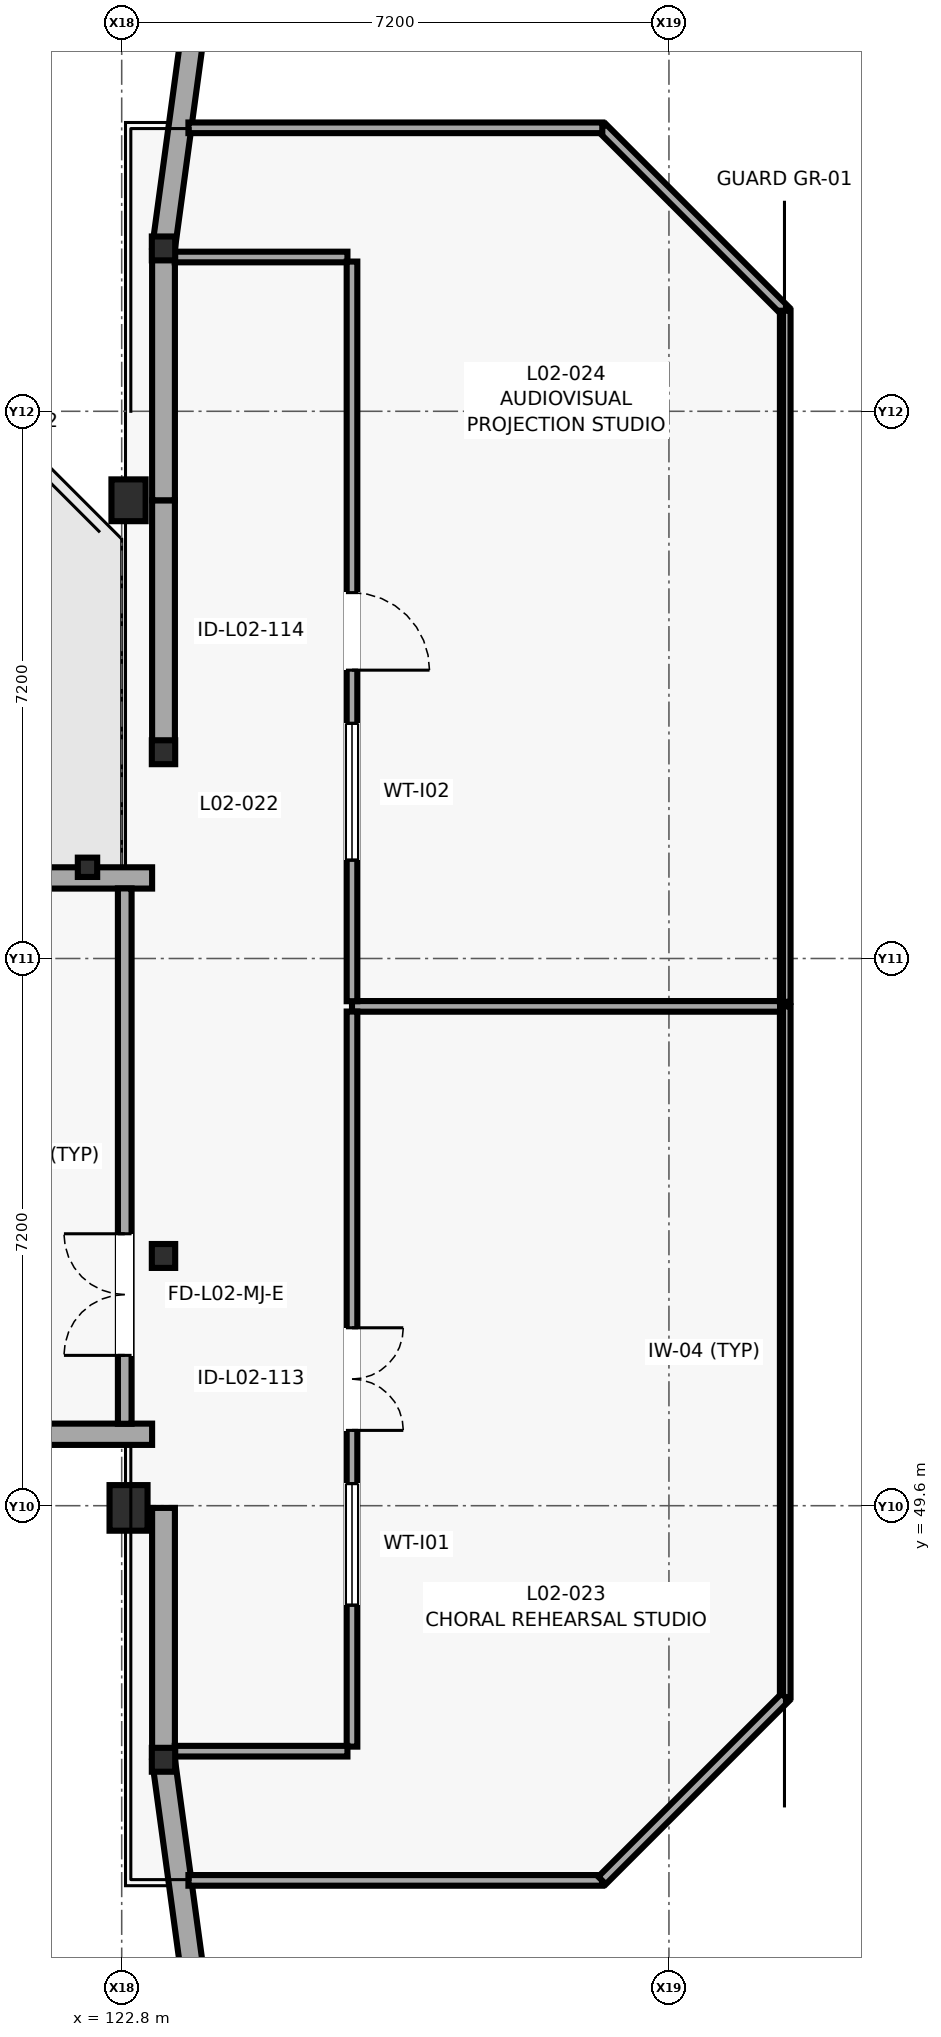
"""IFC4 building model, lengths in metres.
Left out: names, types, materials, properties, quantities, classifications, styles, units other than length and angle.
Written with IfcOpenShell. Run it as: python <this file> out.ifc"""

import sys

from ifc_helpers import new_model, si_unit, direction, frame, frame_2d, origin, origin_2d, place, context, subcontext, project, spatial, rectangle, i_section, extrude, element, fill, save


model = new_model("IFC4")
c1 = context("Model", 3, precision=1e-05, world=origin(), true_north=direction((0.0, 1.0)))
c2 = subcontext(c1, "Body", "Model", "MODEL_VIEW")
j1 = project(units=[si_unit("LENGTHUNIT", "METRE"), si_unit("PLANEANGLEUNIT", "RADIAN")], contexts=[c1])
p1 = place(None, origin())
s1 = spatial("IfcSite", under=j1, at=p1, CompositionType="ELEMENT")
p2 = place(p1, origin())
s2 = spatial("IfcBuilding", under=s1, at=p2, CompositionType="ELEMENT")
p3 = place(p2, frame((0.0, 0.0, 8.2)))
s3 = spatial("IfcBuildingStorey", under=s2, at=p3, CompositionType="ELEMENT", Elevation=8.2)
p4 = place(p3, frame((122.35, 58.0, 0.0), z_axis=(0.0, 0.0, 1.0), x_axis=(1.0, 0.0, 0.0)))
e1 = element("IfcColumn", 1, at=p4, inside=s3, PredefinedType="COLUMN", context=c2, shape_type="SweptSolid", body=[
    extrude(i_section(OverallWidth=0.255, OverallDepth=0.254, WebThickness=0.009, FlangeThickness=0.014, FilletRadius=0.013, at=origin_2d()), origin(), (0.0, 0.0, 1.0), 4.0),
])
p5 = place(p3, frame((122.89, 49.571, 0.0), z_axis=(0.0, 0.0, 1.0), x_axis=(1.0, 0.0, 0.0)))
e2 = element("IfcColumn", 2, at=p5, inside=s3, PredefinedType="PILASTER", context=c2, shape_type="SweptSolid", body=[
    extrude(rectangle(XDim=0.5, YDim=0.6, at=origin_2d()), origin(), (0.0, 0.0, 1.0), 4.0),
])
p6 = place(p3, frame((122.89, 62.829, 0.0), z_axis=(0.0, 0.0, 1.0), x_axis=(1.0, 0.0, 0.0)))
e3 = element("IfcColumn", 3, at=p6, inside=s3, PredefinedType="PILASTER", context=c2, shape_type="SweptSolid", body=[
    extrude(rectangle(XDim=0.45, YDim=0.55, at=origin_2d()), origin(), (0.0, 0.0, 1.0), 4.0),
])
for number, where, z_axis, x_axis in (
    (4, (123.35, 46.257, 0.0), (0.0, 0.0, 1.0), (1.0, 0.0, 0.0)),
    (5, (123.35, 52.886, 0.0), (0.0, 0.0, 1.0), (1.0, 0.0, 0.0)),
    (6, (123.35, 59.514, 0.0), (0.0, 0.0, 1.0), (1.0, 0.0, 0.0)),
    (7, (123.35, 66.143, 0.0), (0.0, 0.0, 1.0), (1.0, 0.0, 0.0)),
):
    element("IfcColumn", number, at=place(p3, frame(where, z_axis=z_axis, x_axis=x_axis)), inside=s3, PredefinedType="COLUMN", context=c2, shape_type="SweptSolid", body=[
        extrude(i_section(OverallWidth=0.307, OverallDepth=0.314, WebThickness=0.012, FlangeThickness=0.019, FilletRadius=0.015, at=origin_2d()), origin(), (0.0, 0.0, 1.0), 4.0),
    ])
p7 = place(p3, frame((123.35, 46.257, 0.0), z_axis=(0.0, 0.0, 1.0), x_axis=(0.134539839792, -0.990908185206, 0.0)))
e8 = element("IfcWall", 8, at=p7, inside=s3, PredefinedType="SOLIDWALL", context=c2, shape_type="SweptSolid", body=[
    extrude(rectangle(XDim=3.344, YDim=0.3, at=frame_2d((1.672, 0.0))), origin(), (0.0, 0.0, 1.0), 3.745),
])
p8 = place(p3, frame((123.35, 49.571, 0.0), z_axis=(0.0, 0.0, 1.0), x_axis=(0.0, -1.0, 0.0)))
e9 = element("IfcWall", 9, at=p8, inside=s3, PredefinedType="SOLIDWALL", context=c2, shape_type="SweptSolid", body=[
    extrude(rectangle(XDim=3.314, YDim=0.3, at=frame_2d((1.657, 0.0))), origin(), (0.0, 0.0, 1.0), 3.505),
])
p9 = place(p3, frame((123.35, 62.829, 0.0), z_axis=(0.0, 0.0, 1.0), x_axis=(0.0, -1.0, 0.0)))
e10 = element("IfcWall", 10, at=p9, inside=s3, PredefinedType="SOLIDWALL", context=c2, shape_type="SweptSolid", body=[
    extrude(rectangle(XDim=3.315, YDim=0.3, at=frame_2d((1.658, 0.0))), origin(), (0.0, 0.0, 1.0), 3.505),
])
p10 = place(p3, frame((123.35, 66.143, 0.0), z_axis=(0.0, 0.0, 1.0), x_axis=(0.0, -1.0, 0.0)))
e11 = element("IfcWall", 11, at=p10, inside=s3, PredefinedType="SOLIDWALL", context=c2, shape_type="SweptSolid", body=[
    extrude(rectangle(XDim=3.314, YDim=0.3, at=frame_2d((1.657, 0.0))), origin(), (0.0, 0.0, 1.0), 3.505),
])
p11 = place(p3, frame((123.8, 69.457, 0.0), z_axis=(0.0, 0.0, 1.0), x_axis=(-0.134539839792, -0.990908185206, 0.0)))
e12 = element("IfcWall", 12, at=p11, inside=s3, PredefinedType="SOLIDWALL", context=c2, shape_type="SweptSolid", body=[
    extrude(rectangle(XDim=3.344, YDim=0.3, at=frame_2d((1.672, 0.0))), origin(), (0.0, 0.0, 1.0), 3.745),
])
p12 = place(p3, frame((115.32, 50.54, 0.0), z_axis=(0.0, 0.0, 1.0), x_axis=(1.0, 0.0, 0.0)))
e13 = element("IfcWall", 13, at=p12, inside=s3, PredefinedType="SOLIDWALL", context=c2, shape_type="SweptSolid", body=[
    extrude(rectangle(XDim=7.88, YDim=0.28, at=frame_2d((3.94, 0.0))), origin(), (0.0, 0.0, 1.0), 3.78),
])
p13 = place(p12, frame((0.82, 0.0, 1.05)))
e14 = element("IfcOpeningElement", 14, at=p13, cuts=e13, PredefinedType="OPENING", context=c2, shape_type="SweptSolid", body=[
    extrude(rectangle(XDim=2.3, YDim=1.45, at=frame_2d((1.15, 0.725))), frame((0.0, 0.15, 0.0), z_axis=(0.0, -1.0, 0.0), x_axis=(1.0, 0.0, 0.0)), (0.0, 0.0, 1.0), 0.3),
])
p14 = place(p12, frame((5.335, 0.0, 1.05)))
e15 = element("IfcOpeningElement", 15, at=p14, cuts=e13, PredefinedType="OPENING", context=c2, shape_type="SweptSolid", body=[
    extrude(rectangle(XDim=1.15, YDim=1.4, at=frame_2d((0.575, 0.7))), frame((0.0, 0.15, 0.0), z_axis=(0.0, -1.0, 0.0), x_axis=(1.0, 0.0, 0.0)), (0.0, 0.0, 1.0), 0.3),
])
p15 = place(p3, frame((123.2, 57.86, 0.0), z_axis=(0.0, 0.0, 1.0), x_axis=(-1.0, 0.0, 0.0)))
e16 = element("IfcWall", 16, at=p15, inside=s3, PredefinedType="SOLIDWALL", context=c2, shape_type="SweptSolid", body=[
    extrude(rectangle(XDim=7.88, YDim=0.28, at=frame_2d((3.94, 0.0))), origin(), (0.0, 0.0, 1.0), 3.11),
])
p16 = place(p15, frame((1.445, 0.0, 1.05)))
e17 = element("IfcOpeningElement", 17, at=p16, cuts=e16, PredefinedType="OPENING", context=c2, shape_type="SweptSolid", body=[
    extrude(rectangle(XDim=1.05, YDim=1.3, at=frame_2d((0.525, 0.65))), frame((0.0, 0.15, 0.0), z_axis=(0.0, -1.0, 0.0), x_axis=(1.0, 0.0, 0.0)), (0.0, 0.0, 1.0), 0.3),
])
p17 = place(p15, frame((5.11, 0.0, 1.05)))
e18 = element("IfcOpeningElement", 18, at=p17, cuts=e16, PredefinedType="OPENING", context=c2, shape_type="SweptSolid", body=[
    extrude(rectangle(XDim=1.6, YDim=1.35, at=frame_2d((0.8, 0.675))), frame((0.0, 0.15, 0.0), z_axis=(0.0, -1.0, 0.0), x_axis=(1.0, 0.0, 0.0)), (0.0, 0.0, 1.0), 0.3),
])
p18 = place(p3, frame((122.84, 50.678, 0.0), z_axis=(0.0, 0.0, 1.0), x_axis=(0.0, 1.0, 0.0)))
e19 = element("IfcWall", 19, at=p18, inside=s3, PredefinedType="PARTITIONING", context=c2, shape_type="SweptSolid", body=[
    extrude(rectangle(XDim=7.044, YDim=0.18, at=frame_2d((3.522, 0.0))), origin(), (0.0, 0.0, 1.0), 3.78),
])
p19 = place(p18, frame((0.9, 0.0, 0.0)))
e20 = element("IfcOpeningElement", 20, at=p19, cuts=e19, PredefinedType="OPENING", context=c2, shape_type="SweptSolid", body=[
    extrude(rectangle(XDim=1.6, YDim=2.25, at=frame_2d((0.8, 1.125))), frame((0.0, 0.1, 0.0), z_axis=(0.0, -1.0, 0.0), x_axis=(1.0, 0.0, 0.0)), (0.0, 0.0, 1.0), 0.2),
])
p20 = place(p3, frame((131.53, 47.079, 0.0), z_axis=(0.0, 0.0, 1.0), x_axis=(0.0, 1.0, 0.0)))
e21 = element("IfcWall", 21, at=p20, inside=s3, PredefinedType="PARTITIONING", context=c2, shape_type="SweptSolid", body=[
    extrude(rectangle(XDim=9.091, YDim=0.14, at=frame_2d((4.545, 0.0))), origin(), (0.0, 0.0, 1.0), 3.755),
])
p21 = place(p3, frame((131.462, 56.17, 0.0), z_axis=(0.0, 0.0, 1.0), x_axis=(-1.0, 0.0, 0.0)))
e22 = element("IfcWall", 22, at=p21, inside=s3, PredefinedType="PARTITIONING", context=c2, shape_type="SweptSolid", body=[
    extrude(rectangle(XDim=5.632, YDim=0.14, at=frame_2d((2.816, 0.0))), origin(), (0.0, 0.0, 1.0), 3.755),
])
p22 = place(p3, frame((125.83, 56.102, 0.0), z_axis=(0.0, 0.0, 1.0), x_axis=(0.0, -1.0, 0.0)))
e23 = element("IfcWall", 23, at=p22, inside=s3, PredefinedType="PARTITIONING", context=c2, shape_type="SweptSolid", body=[
    extrude(rectangle(XDim=9.672, YDim=0.14, at=frame_2d((4.836, 0.0))), origin(), (0.0, 0.0, 1.0), 3.755),
])
p23 = place(p22, frame((4.161, 0.0, 0.0)))
e24 = element("IfcOpeningElement", 24, at=p23, cuts=e23, PredefinedType="OPENING", context=c2, shape_type="SweptSolid", body=[
    extrude(rectangle(XDim=1.35, YDim=2.25, at=frame_2d((0.675, 1.125))), frame((0.0, 0.08, 0.0), z_axis=(0.0, -1.0, 0.0), x_axis=(1.0, 0.0, 0.0)), (0.0, 0.0, 1.0), 0.16),
])
p24 = place(p22, frame((6.211, 0.0, 1.05)))
e25 = element("IfcOpeningElement", 25, at=p24, cuts=e23, PredefinedType="OPENING", context=c2, shape_type="SweptSolid", body=[
    extrude(rectangle(XDim=1.6, YDim=1.1, at=frame_2d((0.8, 0.55))), frame((0.0, 0.08, 0.0), z_axis=(0.0, -1.0, 0.0), x_axis=(1.0, 0.0, 0.0)), (0.0, 0.0, 1.0), 0.16),
])
p25 = place(p3, frame((125.77, 46.37, 0.0), z_axis=(0.0, 0.0, 1.0), x_axis=(-1.0, 0.0, 0.0)))
e26 = element("IfcWall", 26, at=p25, inside=s3, PredefinedType="PARTITIONING", context=c2, shape_type="SweptSolid", body=[
    extrude(rectangle(XDim=2.272, YDim=0.14, at=frame_2d((1.136, 0.0))), origin(), (0.0, 0.0, 1.0), 3.755),
])
p26 = place(p3, frame((123.678, 44.67, 0.0), z_axis=(0.0, 0.0, 1.0), x_axis=(1.0, 0.0, 0.0)))
e27 = element("IfcWall", 27, at=p26, inside=s3, PredefinedType="PARTITIONING", context=c2, shape_type="SweptSolid", body=[
    extrude(rectangle(XDim=5.443, YDim=0.14, at=frame_2d((2.722, 0.0))), origin(), (0.0, 0.0, 1.0), 3.755),
])
p27 = place(p3, frame((129.12, 44.669, 0.0), z_axis=(0.0, 0.0, 1.0), x_axis=(0.707070979218, 0.707142581342, 0.0)))
e28 = element("IfcWall", 28, at=p27, inside=s3, PredefinedType="PARTITIONING", context=c2, shape_type="SweptSolid", body=[
    extrude(rectangle(XDim=3.41, YDim=0.14, at=frame_2d((1.705, 0.0))), origin(), (0.0, 0.0, 1.0), 3.755),
])
p28 = place(p3, frame((131.53, 65.321, 0.0), z_axis=(0.0, 0.0, 1.0), x_axis=(-0.707106781187, 0.707106781187, 0.0)))
e29 = element("IfcWall", 29, at=p28, inside=s3, PredefinedType="PARTITIONING", context=c2, shape_type="SweptSolid", body=[
    extrude(rectangle(XDim=3.407, YDim=0.14, at=frame_2d((1.703, 0.0))), origin(), (0.0, 0.0, 1.0), 3.755),
])
p29 = place(p3, frame((129.123, 67.73, 0.0), z_axis=(0.0, 0.0, 1.0), x_axis=(-1.0, 0.0, 0.0)))
e30 = element("IfcWall", 30, at=p29, inside=s3, PredefinedType="PARTITIONING", context=c2, shape_type="SweptSolid", body=[
    extrude(rectangle(XDim=5.445, YDim=0.14, at=frame_2d((2.723, 0.0))), origin(), (0.0, 0.0, 1.0), 3.755),
])
p30 = place(p3, frame((123.498, 66.03, 0.0), z_axis=(0.0, 0.0, 1.0), x_axis=(1.0, 0.0, 0.0)))
e31 = element("IfcWall", 31, at=p30, inside=s3, PredefinedType="PARTITIONING", context=c2, shape_type="SweptSolid", body=[
    extrude(rectangle(XDim=2.272, YDim=0.14, at=frame_2d((1.136, 0.0))), origin(), (0.0, 0.0, 1.0), 3.755),
])
p31 = place(p3, frame((125.83, 65.97, 0.0), z_axis=(0.0, 0.0, 1.0), x_axis=(0.0, -1.0, 0.0)))
e32 = element("IfcWall", 32, at=p31, inside=s3, PredefinedType="PARTITIONING", context=c2, shape_type="SweptSolid", body=[
    extrude(rectangle(XDim=9.732, YDim=0.14, at=frame_2d((4.866, 0.0))), origin(), (0.0, 0.0, 1.0), 3.755),
])
p32 = place(p31, frame((4.356, 0.0, 0.0)))
e33 = element("IfcOpeningElement", 33, at=p32, cuts=e32, PredefinedType="OPENING", context=c2, shape_type="SweptSolid", body=[
    extrude(rectangle(XDim=1.02, YDim=2.14, at=frame_2d((0.51, 1.07))), frame((0.0, 0.08, 0.0), z_axis=(0.0, -1.0, 0.0), x_axis=(1.0, 0.0, 0.0)), (0.0, 0.0, 1.0), 0.16),
])
p33 = place(p31, frame((6.076, 0.0, 1.05)))
e34 = element("IfcOpeningElement", 34, at=p33, cuts=e32, PredefinedType="OPENING", context=c2, shape_type="SweptSolid", body=[
    extrude(rectangle(XDim=1.8, YDim=1.2, at=frame_2d((0.9, 0.6))), frame((0.0, 0.08, 0.0), z_axis=(0.0, -1.0, 0.0), x_axis=(1.0, 0.0, 0.0)), (0.0, 0.0, 1.0), 0.16),
])
p34 = place(p3, frame((131.53, 56.23, 0.0), z_axis=(0.0, 0.0, 1.0), x_axis=(0.0, 1.0, 0.0)))
e35 = element("IfcWall", 35, at=p34, inside=s3, PredefinedType="PARTITIONING", context=c2, shape_type="SweptSolid", body=[
    extrude(rectangle(XDim=9.093, YDim=0.14, at=frame_2d((4.546, 0.0))), origin(), (0.0, 0.0, 1.0), 3.755),
])
p35 = place(p19, origin())
e36 = element("IfcDoor", 36, at=p35, inside=s3, OperationType="DOUBLE_DOOR_SINGLE_SWING", PredefinedType="DOOR", context=c2, shape_type="SweptSolid", body=[
    extrude(rectangle(XDim=1.6, YDim=2.25, at=frame_2d((0.8, 1.125))), frame((0.0, 0.025, 0.0), z_axis=(0.0, -1.0, 0.0), x_axis=(1.0, 0.0, 0.0)), (0.0, 0.0, 1.0), 0.05),
])
fill(e20, e36)
p36 = place(p23, origin())
e37 = element("IfcDoor", 37, at=p36, inside=s3, OperationType="DOUBLE_DOOR_SINGLE_SWING", PredefinedType="DOOR", context=c2, shape_type="SweptSolid", body=[
    extrude(rectangle(XDim=1.35, YDim=2.25, at=frame_2d((0.675, 1.125))), frame((0.0, 0.025, 0.0), z_axis=(0.0, -1.0, 0.0), x_axis=(1.0, 0.0, 0.0)), (0.0, 0.0, 1.0), 0.05),
])
fill(e24, e37)
p37 = place(p24, origin())
e38 = element("IfcWindow", 38, at=p37, inside=s3, PartitioningType="SINGLE_PANEL", PredefinedType="WINDOW", context=c2, shape_type="SweptSolid", body=[
    extrude(rectangle(XDim=1.6, YDim=1.1, at=frame_2d((0.8, 0.55))), frame((0.0, 0.03, 0.0), z_axis=(0.0, -1.0, 0.0), x_axis=(1.0, 0.0, 0.0)), (0.0, 0.0, 1.0), 0.06),
])
fill(e25, e38)
p38 = place(p32, origin())
e39 = element("IfcDoor", 39, at=p38, inside=s3, OperationType="SINGLE_SWING_RIGHT", PredefinedType="DOOR", context=c2, shape_type="SweptSolid", body=[
    extrude(rectangle(XDim=1.02, YDim=2.14, at=frame_2d((0.51, 1.07))), frame((0.0, 0.025, 0.0), z_axis=(0.0, -1.0, 0.0), x_axis=(1.0, 0.0, 0.0)), (0.0, 0.0, 1.0), 0.05),
])
fill(e33, e39)
p39 = place(p33, origin())
e40 = element("IfcWindow", 40, at=p39, inside=s3, PartitioningType="SINGLE_PANEL", PredefinedType="WINDOW", context=c2, shape_type="SweptSolid", body=[
    extrude(rectangle(XDim=1.8, YDim=1.2, at=frame_2d((0.9, 0.6))), frame((0.0, 0.03, 0.0), z_axis=(0.0, -1.0, 0.0), x_axis=(1.0, 0.0, 0.0)), (0.0, 0.0, 1.0), 0.06),
])
fill(e34, e40)
save(model, sys.argv[1])
